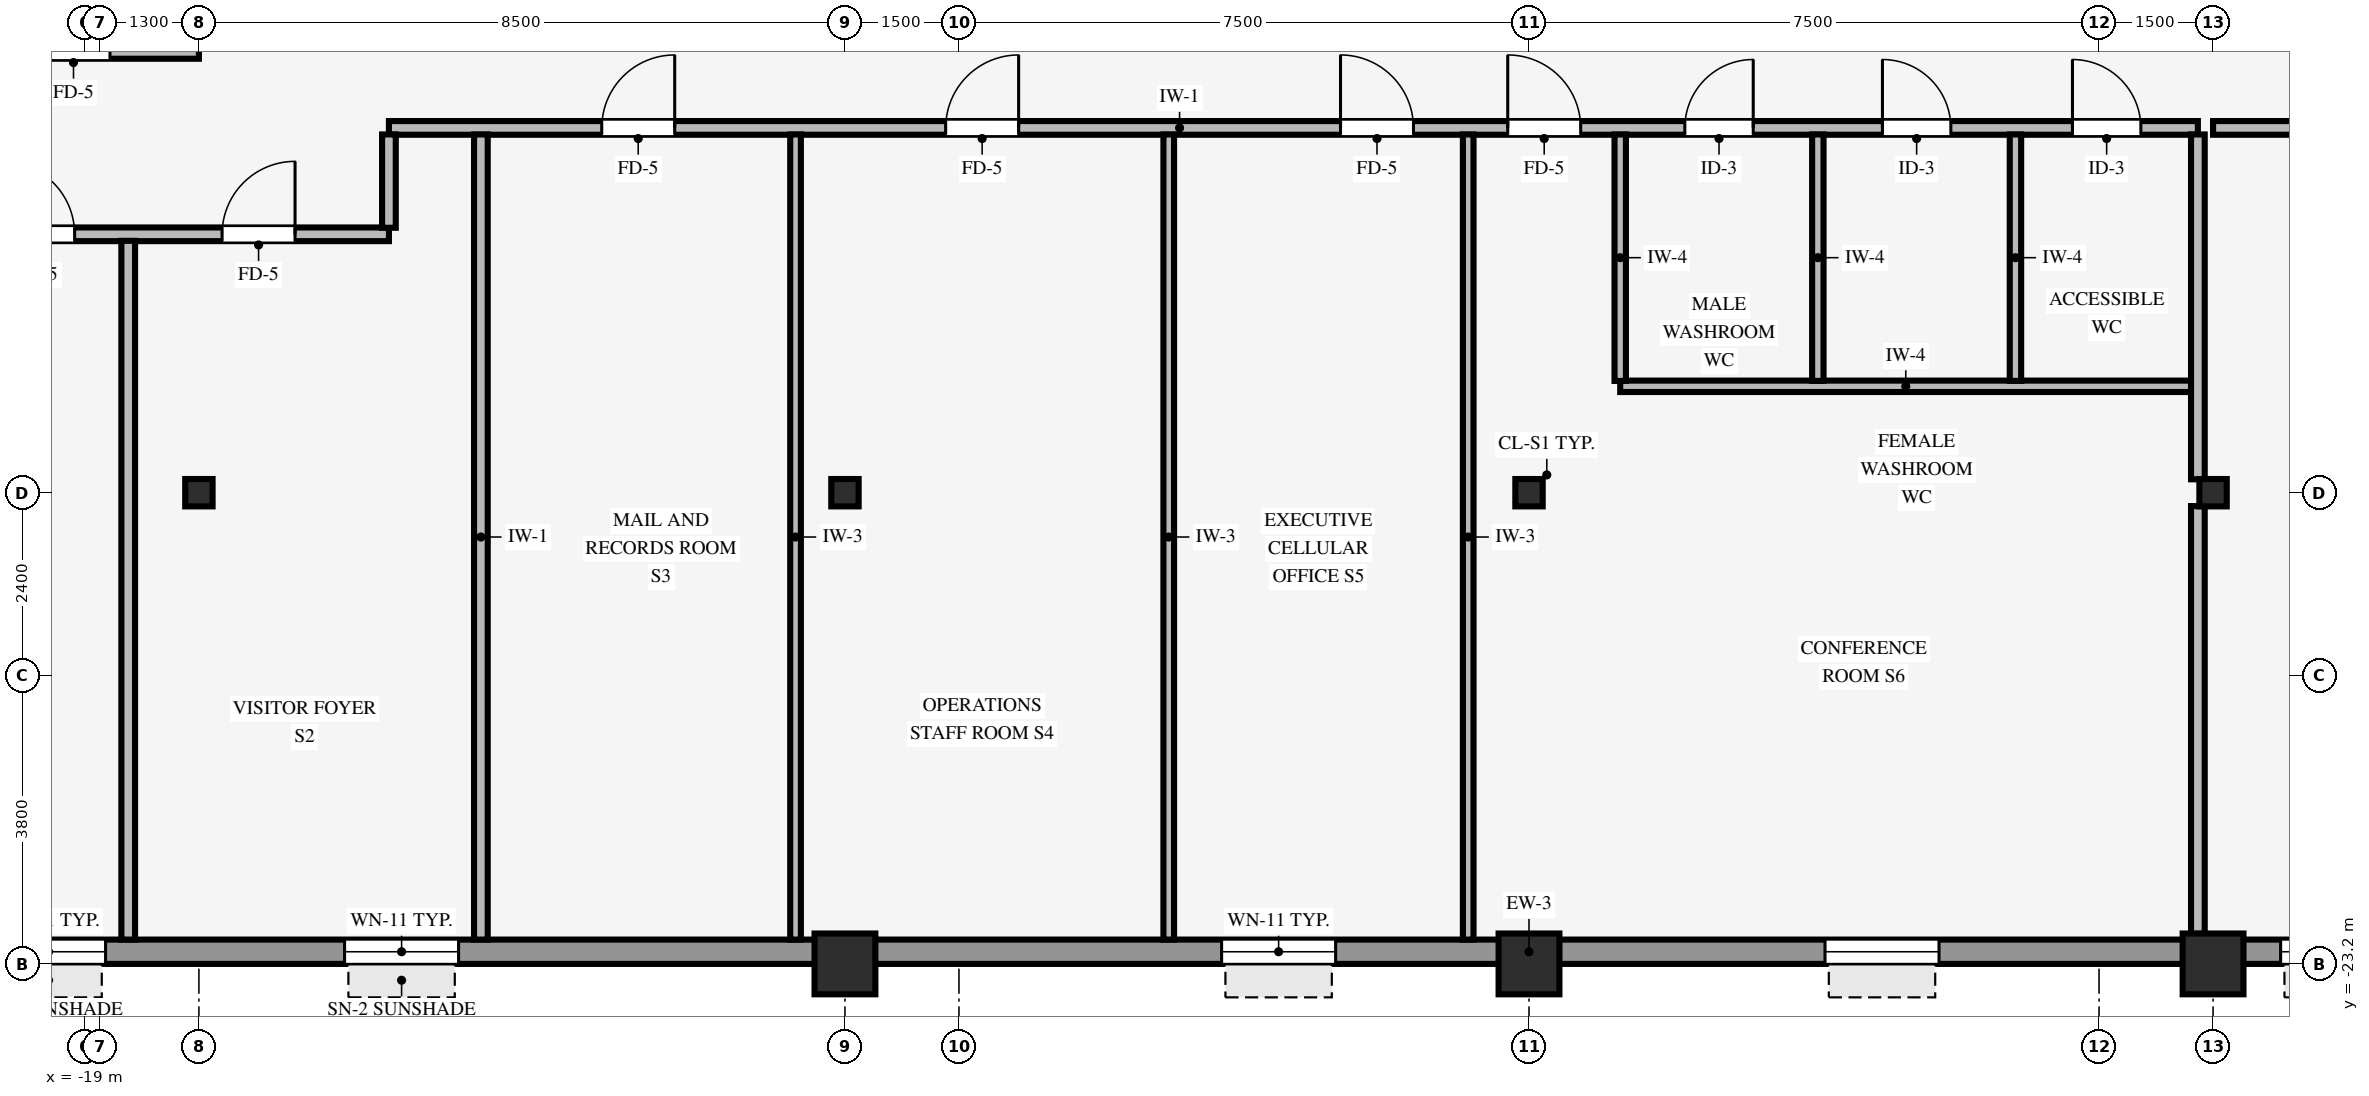
"""IFC4 building model, lengths in metres.
Left out: names, types, materials, properties, quantities, classifications, styles, units other than length and angle.
Written with IfcOpenShell. Run it as: python <this file> out.ifc"""

import sys

from ifc_helpers import new_model, si_unit, direction, frame, frame_2d, origin, origin_2d, place, context, subcontext, project, spatial, rectangle, hollow_rectangle, i_section, extrude, source, transform, mapped, element, fill, save


model = new_model("IFC4")
c1 = context("Model", 3, precision=1e-05, world=origin(), true_north=direction((0.0, 1.0)))
c2 = subcontext(c1, "Body", "Model", "MODEL_VIEW")
j1 = project(units=[si_unit("LENGTHUNIT", "METRE"), si_unit("PLANEANGLEUNIT", "RADIAN")], contexts=[c1])
p1 = place(None, origin())
s1 = spatial("IfcSite", under=j1, at=p1, CompositionType="ELEMENT")
p2 = place(p1, origin())
s2 = spatial("IfcBuilding", under=s1, at=p2, CompositionType="ELEMENT")
p3 = place(p2, frame((0.0, 0.0, 89.65)))
s3 = spatial("IfcBuildingStorey", under=s2, at=p3, CompositionType="ELEMENT", Elevation=89.65)
for number, where, z_axis, x_axis in (
    (1, (-9.0, -23.2, 0.0), (0.0, 0.0, 1.0), (1.0, 0.0, 0.0)),
    (2, (0.0, -23.2, 0.0), (0.0, 0.0, 1.0), (1.0, 0.0, 0.0)),
    (3, (9.0, -23.2, 0.0), (0.0, 0.0, 1.0), (1.0, 0.0, 0.0)),
):
    element("IfcColumn", number, at=place(p3, frame(where, z_axis=z_axis, x_axis=x_axis)), inside=s3, PredefinedType="COLUMN", context=c2, shape_type="SweptSolid", body=[
        extrude(hollow_rectangle(XDim=0.8, YDim=0.8, WallThickness=0.055, InnerFilletRadius=0.055, OuterFilletRadius=0.11, at=origin_2d()), origin(), (0.0, 0.0, 1.0), 3.25),
    ])
for number, where, z_axis, x_axis in (
    (4, (0.0, -17.0, 0.0), (0.0, 0.0, 1.0), (1.0, 0.0, 0.0)),
    (5, (-17.5, -17.0, 0.0), (0.0, 0.0, 1.0), (1.0, 0.0, 0.0)),
    (6, (-9.0, -17.0, 0.0), (0.0, 0.0, 1.0), (1.0, 0.0, 0.0)),
    (7, (9.0, -17.0, 0.0), (0.0, 0.0, 1.0), (1.0, 0.0, 0.0)),
):
    element("IfcColumn", number, at=place(p3, frame(where, z_axis=z_axis, x_axis=x_axis)), inside=s3, PredefinedType="COLUMN", context=c2, shape_type="SweptSolid", body=[
        extrude(i_section(OverallWidth=0.36, OverallDepth=0.36, WebThickness=0.021, FlangeThickness=0.021, FilletRadius=0.018, at=origin_2d()), origin(), (0.0, 0.0, 1.0), 3.25),
    ])
p4 = place(p3, frame((-21.9, -23.04, 0.0), z_axis=(0.0, 0.0, 1.0), x_axis=(1.0, 0.0, 0.0)))
e8 = element("IfcWall", 8, at=p4, inside=s3, PredefinedType="STANDARD", context=c2, shape_type="SweptSolid", body=[
    extrude(rectangle(XDim=43.8, YDim=0.32, at=frame_2d((21.9, 0.0))), origin(), (0.0, 0.0, 1.0), 2.585),
])
p5 = place(p4, frame((1.672, 0.0, 0.8)))
e9 = element("IfcOpeningElement", 9, at=p5, cuts=e8, PredefinedType="OPENING", context=c2, shape_type="SweptSolid", body=[
    extrude(rectangle(XDim=1.5, YDim=1.6, at=frame_2d((0.75, 0.8))), frame((0.0, 0.17, 0.0), z_axis=(0.0, -1.0, 0.0), x_axis=(1.0, 0.0, 0.0)), (0.0, 0.0, 1.0), 0.34),
])
p6 = place(p4, frame((6.317, 0.0, 0.8)))
e10 = element("IfcOpeningElement", 10, at=p6, cuts=e8, PredefinedType="OPENING", context=c2, shape_type="SweptSolid", body=[
    extrude(rectangle(XDim=1.5, YDim=1.6, at=frame_2d((0.75, 0.8))), frame((0.0, 0.17, 0.0), z_axis=(0.0, -1.0, 0.0), x_axis=(1.0, 0.0, 0.0)), (0.0, 0.0, 1.0), 0.34),
])
p7 = place(p4, frame((17.856, 0.0, 0.8)))
e11 = element("IfcOpeningElement", 11, at=p7, cuts=e8, PredefinedType="OPENING", context=c2, shape_type="SweptSolid", body=[
    extrude(rectangle(XDim=1.5, YDim=1.6, at=frame_2d((0.75, 0.8))), frame((0.0, 0.17, 0.0), z_axis=(0.0, -1.0, 0.0), x_axis=(1.0, 0.0, 0.0)), (0.0, 0.0, 1.0), 0.34),
])
p8 = place(p4, frame((25.794, 0.0, 0.8)))
e12 = element("IfcOpeningElement", 12, at=p8, cuts=e8, PredefinedType="OPENING", context=c2, shape_type="SweptSolid", body=[
    extrude(rectangle(XDim=1.5, YDim=1.6, at=frame_2d((0.75, 0.8))), frame((0.0, 0.17, 0.0), z_axis=(0.0, -1.0, 0.0), x_axis=(1.0, 0.0, 0.0)), (0.0, 0.0, 1.0), 0.34),
])
p9 = place(p4, frame((31.789, 0.0, 0.8)))
e13 = element("IfcOpeningElement", 13, at=p9, cuts=e8, PredefinedType="OPENING", context=c2, shape_type="SweptSolid", body=[
    extrude(rectangle(XDim=1.5, YDim=1.6, at=frame_2d((0.75, 0.8))), frame((0.0, 0.17, 0.0), z_axis=(0.0, -1.0, 0.0), x_axis=(1.0, 0.0, 0.0)), (0.0, 0.0, 1.0), 0.34),
])
p10 = place(p4, frame((35.083, 0.0, 0.8)))
e14 = element("IfcOpeningElement", 14, at=p10, cuts=e8, PredefinedType="OPENING", context=c2, shape_type="SweptSolid", body=[
    extrude(rectangle(XDim=1.5, YDim=1.6, at=frame_2d((0.75, 0.8))), frame((0.0, 0.17, 0.0), z_axis=(0.0, -1.0, 0.0), x_axis=(1.0, 0.0, 0.0)), (0.0, 0.0, 1.0), 0.34),
])
p11 = place(p4, frame((39.728, 0.0, 0.8)))
e15 = element("IfcOpeningElement", 15, at=p11, cuts=e8, PredefinedType="OPENING", context=c2, shape_type="SweptSolid", body=[
    extrude(rectangle(XDim=1.5, YDim=1.6, at=frame_2d((0.75, 0.8))), frame((0.0, 0.17, 0.0), z_axis=(0.0, -1.0, 0.0), x_axis=(1.0, 0.0, 0.0)), (0.0, 0.0, 1.0), 0.34),
])
p12 = place(p3, frame((1.2, -15.6, 0.0), z_axis=(0.0, 0.0, 1.0), x_axis=(1.0, 0.0, 0.0)))
e16 = element("IfcWall", 16, at=p12, inside=s3, PredefinedType="PARTITIONING", context=c2, shape_type="SweptSolid", body=[
    extrude(rectangle(XDim=7.514, YDim=0.15, at=frame_2d((3.757, 0.0))), origin(), (0.0, 0.0, 1.0), 3.24),
])
p13 = place(p3, frame((-20.8, -13.6, 0.0), z_axis=(0.0, 0.0, 1.0), x_axis=(1.0, 0.0, 0.0)))
e17 = element("IfcWall", 17, at=p13, inside=s3, PredefinedType="PARTITIONING", context=c2, shape_type="SweptSolid", body=[
    extrude(rectangle(XDim=5.8, YDim=0.18, at=frame_2d((2.9, 0.0))), origin(), (0.0, 0.0, 1.0), 2.878),
])
p14 = place(p13, frame((3.605, 0.0, 0.0)))
e18 = element("IfcOpeningElement", 18, at=p14, cuts=e17, PredefinedType="OPENING", context=c2, shape_type="SweptSolid", body=[
    extrude(rectangle(XDim=0.96, YDim=2.1, at=frame_2d((0.48, 1.05))), frame((0.0, 0.1, 0.0), z_axis=(0.0, -1.0, 0.0), x_axis=(1.0, 0.0, 0.0)), (0.0, 0.0, 1.0), 0.2),
])
p15 = place(p13, frame((0.705, 0.0, 0.0)))
e19 = element("IfcOpeningElement", 19, at=p15, cuts=e17, PredefinedType="OPENING", context=c2, shape_type="SweptSolid", body=[
    extrude(rectangle(XDim=0.96, YDim=2.1, at=frame_2d((0.48, 1.05))), frame((0.0, 0.1, 0.0), z_axis=(0.0, -1.0, 0.0), x_axis=(1.0, 0.0, 0.0)), (0.0, 0.0, 1.0), 0.2),
])
p16 = place(p3, frame((-15.0, -12.2, 0.0), z_axis=(0.0, 0.0, 1.0), x_axis=(1.0, 0.0, 0.0)))
e20 = element("IfcWall", 20, at=p16, inside=s3, PredefinedType="PARTITIONING", context=c2, shape_type="SweptSolid", body=[
    extrude(rectangle(XDim=23.8, YDim=0.18, at=frame_2d((11.9, 0.0))), origin(), (0.0, 0.0, 1.0), 3.24),
])
p17 = place(p16, frame((7.325, 0.0, 0.0)))
e21 = element("IfcOpeningElement", 21, at=p17, cuts=e20, PredefinedType="OPENING", context=c2, shape_type="SweptSolid", body=[
    extrude(rectangle(XDim=0.96, YDim=2.1, at=frame_2d((0.48, 1.05))), frame((0.0, 0.1, 0.0), z_axis=(0.0, -1.0, 0.0), x_axis=(1.0, 0.0, 0.0)), (0.0, 0.0, 1.0), 0.2),
])
p18 = place(p16, frame((2.8, 0.0, 0.0)))
e22 = element("IfcOpeningElement", 22, at=p18, cuts=e20, PredefinedType="OPENING", context=c2, shape_type="SweptSolid", body=[
    extrude(rectangle(XDim=0.96, YDim=2.1, at=frame_2d((0.48, 1.05))), frame((0.0, 0.1, 0.0), z_axis=(0.0, -1.0, 0.0), x_axis=(1.0, 0.0, 0.0)), (0.0, 0.0, 1.0), 0.2),
])
p19 = place(p16, frame((19.65, 0.0, 0.0)))
e23 = element("IfcOpeningElement", 23, at=p19, cuts=e20, PredefinedType="OPENING", context=c2, shape_type="SweptSolid", body=[
    extrude(rectangle(XDim=0.9, YDim=2.1, at=frame_2d((0.45, 1.05))), frame((0.0, 0.1, 0.0), z_axis=(0.0, -1.0, 0.0), x_axis=(1.0, 0.0, 0.0)), (0.0, 0.0, 1.0), 0.2),
])
p20 = place(p16, frame((17.05, 0.0, 0.0)))
e24 = element("IfcOpeningElement", 24, at=p20, cuts=e20, PredefinedType="OPENING", context=c2, shape_type="SweptSolid", body=[
    extrude(rectangle(XDim=0.9, YDim=2.1, at=frame_2d((0.45, 1.05))), frame((0.0, 0.1, 0.0), z_axis=(0.0, -1.0, 0.0), x_axis=(1.0, 0.0, 0.0)), (0.0, 0.0, 1.0), 0.2),
])
p21 = place(p16, frame((22.15, 0.0, 0.0)))
e25 = element("IfcOpeningElement", 25, at=p21, cuts=e20, PredefinedType="OPENING", context=c2, shape_type="SweptSolid", body=[
    extrude(rectangle(XDim=0.9, YDim=2.1, at=frame_2d((0.45, 1.05))), frame((0.0, 0.1, 0.0), z_axis=(0.0, -1.0, 0.0), x_axis=(1.0, 0.0, 0.0)), (0.0, 0.0, 1.0), 0.2),
])
p22 = place(p16, frame((12.52, 0.0, 0.0)))
e26 = element("IfcOpeningElement", 26, at=p22, cuts=e20, PredefinedType="OPENING", context=c2, shape_type="SweptSolid", body=[
    extrude(rectangle(XDim=0.96, YDim=2.1, at=frame_2d((0.48, 1.05))), frame((0.0, 0.1, 0.0), z_axis=(0.0, -1.0, 0.0), x_axis=(1.0, 0.0, 0.0)), (0.0, 0.0, 1.0), 0.2),
])
p23 = place(p16, frame((14.72, 0.0, 0.0)))
e27 = element("IfcOpeningElement", 27, at=p23, cuts=e20, PredefinedType="OPENING", context=c2, shape_type="SweptSolid", body=[
    extrude(rectangle(XDim=0.96, YDim=2.1, at=frame_2d((0.48, 1.05))), frame((0.0, 0.1, 0.0), z_axis=(0.0, -1.0, 0.0), x_axis=(1.0, 0.0, 0.0)), (0.0, 0.0, 1.0), 0.2),
])
p24 = place(p3, frame((9.0, -12.2, 0.0), z_axis=(0.0, 0.0, 1.0), x_axis=(1.0, 0.0, 0.0)))
e28 = element("IfcWall", 28, at=p24, inside=s3, PredefinedType="PARTITIONING", context=c2, shape_type="SweptSolid", body=[
    extrude(rectangle(XDim=6.0, YDim=0.18, at=frame_2d((3.0, 0.0))), origin(), (0.0, 0.0, 1.0), 3.24),
])
p25 = place(p24, frame((2.52, 0.0, 0.0)))
e29 = element("IfcOpeningElement", 29, at=p25, cuts=e28, PredefinedType="OPENING", context=c2, shape_type="SweptSolid", body=[
    extrude(rectangle(XDim=0.96, YDim=2.1, at=frame_2d((0.48, 1.05))), frame((0.0, 0.1, 0.0), z_axis=(0.0, -1.0, 0.0), x_axis=(1.0, 0.0, 0.0)), (0.0, 0.0, 1.0), 0.2),
])
p26 = place(p3, frame((-23.68, -11.2, 0.0), z_axis=(0.0, 0.0, 1.0), x_axis=(1.0, 0.0, 0.0)))
e30 = element("IfcWall", 30, at=p26, inside=s3, PredefinedType="PARTITIONING", context=c2, shape_type="SweptSolid", body=[
    extrude(rectangle(XDim=6.18, YDim=0.18, at=frame_2d((3.09, 0.0))), origin(), (0.0, 0.0, 1.0), 3.24),
])
p27 = place(p26, frame((4.05, 0.0, 0.0)))
e31 = element("IfcOpeningElement", 31, at=p27, cuts=e30, PredefinedType="OPENING", context=c2, shape_type="SweptSolid", body=[
    extrude(rectangle(XDim=0.96, YDim=2.1, at=frame_2d((0.48, 1.05))), frame((0.0, 0.1, 0.0), z_axis=(0.0, -1.0, 0.0), x_axis=(1.0, 0.0, 0.0)), (0.0, 0.0, 1.0), 0.2),
])
p28 = place(p3, frame((-18.43, -22.88, 0.0), z_axis=(0.0, 0.0, 1.0), x_axis=(0.0, 1.0, 0.0)))
e32 = element("IfcWall", 32, at=p28, inside=s3, PredefinedType="PARTITIONING", context=c2, shape_type="SweptSolid", body=[
    extrude(rectangle(XDim=9.194, YDim=0.18, at=frame_2d((4.597, 0.0))), origin(), (0.0, 0.0, 1.0), 3.24),
])
p29 = place(p3, frame((-15.0, -13.514, 0.0), z_axis=(0.0, 0.0, 1.0), x_axis=(0.0, 1.0, 0.0)))
e33 = element("IfcWall", 33, at=p29, inside=s3, PredefinedType="PARTITIONING", context=c2, shape_type="SweptSolid", body=[
    extrude(rectangle(XDim=1.228, YDim=0.18, at=frame_2d((0.614, 0.0))), origin(), (0.0, 0.0, 1.0), 3.24),
])
p30 = place(p3, frame((-13.79, -22.88, 0.0), z_axis=(0.0, 0.0, 1.0), x_axis=(0.0, 1.0, 0.0)))
e34 = element("IfcWall", 34, at=p30, inside=s3, PredefinedType="PARTITIONING", context=c2, shape_type="SweptSolid", body=[
    extrude(rectangle(XDim=10.594, YDim=0.18, at=frame_2d((5.297, 0.0))), origin(), (0.0, 0.0, 1.0), 3.24),
])
for number, where, z_axis, x_axis in (
    (35, (-9.65, -22.88, 0.0), (0.0, 0.0, 1.0), (0.0, 1.0, 0.0)),
    (36, (-4.74, -22.88, 0.0), (0.0, 0.0, 1.0), (0.0, 1.0, 0.0)),
    (37, (-0.8, -22.88, 0.0), (0.0, 0.0, 1.0), (0.0, 1.0, 0.0)),
):
    element("IfcWall", number, at=place(p3, frame(where, z_axis=z_axis, x_axis=x_axis)), inside=s3, PredefinedType="PARTITIONING", context=c2, shape_type="SweptSolid", body=[
        extrude(rectangle(XDim=10.594, YDim=0.14, at=frame_2d((5.297, 0.0))), origin(), (0.0, 0.0, 1.0), 3.24),
    ])
for number, where, z_axis, x_axis in (
    (38, (1.2, -15.529, 0.0), (0.0, 0.0, 1.0), (0.0, 1.0, 0.0)),
    (39, (3.8, -15.529, 0.0), (0.0, 0.0, 1.0), (0.0, 1.0, 0.0)),
    (40, (6.4, -15.529, 0.0), (0.0, 0.0, 1.0), (0.0, 1.0, 0.0)),
):
    element("IfcWall", number, at=place(p3, frame(where, z_axis=z_axis, x_axis=x_axis)), inside=s3, PredefinedType="PARTITIONING", context=c2, shape_type="SweptSolid", body=[
        extrude(rectangle(XDim=3.243, YDim=0.15, at=frame_2d((1.622, 0.0))), origin(), (0.0, 0.0, 1.0), 3.24),
    ])
p31 = place(p3, frame((8.8, -22.804, 0.0), z_axis=(0.0, 0.0, 1.0), x_axis=(0.0, 1.0, 0.0)))
e41 = element("IfcWall", 41, at=p31, inside=s3, PredefinedType="PARTITIONING", context=c2, shape_type="SweptSolid", body=[
    extrude(rectangle(XDim=5.628, YDim=0.18, at=frame_2d((2.814, 0.0))), origin(), (0.0, 0.0, 1.0), 2.335),
])
p32 = place(p3, frame((8.8, -16.824, 0.0), z_axis=(0.0, 0.0, 1.0), x_axis=(0.0, 1.0, 0.0)))
e42 = element("IfcWall", 42, at=p32, inside=s3, PredefinedType="PARTITIONING", context=c2, shape_type="SweptSolid", body=[
    extrude(rectangle(XDim=4.538, YDim=0.18, at=frame_2d((2.269, 0.0))), origin(), (0.0, 0.0, 1.0), 2.335),
])
m1 = source(origin(), c2, "Body", "SweptSolid", [
    extrude(rectangle(XDim=1.5, YDim=1.6, at=frame_2d((0.75, 0.8))), frame((0.0, 0.03, 0.0), z_axis=(0.0, -1.0, 0.0), x_axis=(1.0, 0.0, 0.0)), (0.0, 0.0, 1.0), 0.06),
])
p33 = place(p5, origin())
e43 = element("IfcWindow", 43, at=p33, inside=s3, PartitioningType="SINGLE_PANEL", PredefinedType="WINDOW", context=c2, shape_type="MappedRepresentation", body=[
    mapped(m1, transform((0.0, 0.0, 0.0), scale=1.0)),
])
fill(e9, e43)
p34 = place(p6, origin())
e44 = element("IfcWindow", 44, at=p34, inside=s3, PartitioningType="SINGLE_PANEL", PredefinedType="WINDOW", context=c2, shape_type="MappedRepresentation", body=[
    mapped(m1, transform((0.0, 0.0, 0.0), scale=1.0)),
])
fill(e10, e44)
p35 = place(p7, origin())
e45 = element("IfcWindow", 45, at=p35, inside=s3, PartitioningType="SINGLE_PANEL", PredefinedType="WINDOW", context=c2, shape_type="MappedRepresentation", body=[
    mapped(m1, transform((0.0, 0.0, 0.0), scale=1.0)),
])
fill(e11, e45)
p36 = place(p8, origin())
e46 = element("IfcWindow", 46, at=p36, inside=s3, PartitioningType="SINGLE_PANEL", PredefinedType="WINDOW", context=c2, shape_type="MappedRepresentation", body=[
    mapped(m1, transform((0.0, 0.0, 0.0), scale=1.0)),
])
fill(e12, e46)
p37 = place(p9, origin())
e47 = element("IfcWindow", 47, at=p37, inside=s3, PartitioningType="SINGLE_PANEL", PredefinedType="WINDOW", context=c2, shape_type="MappedRepresentation", body=[
    mapped(m1, transform((0.0, 0.0, 0.0), scale=1.0)),
])
fill(e13, e47)
m2 = source(origin(), c2, "Body", "SweptSolid", [
    extrude(rectangle(XDim=0.96, YDim=2.1, at=frame_2d((0.48, 1.05))), frame((0.0, 0.025, 0.0), z_axis=(0.0, -1.0, 0.0), x_axis=(1.0, 0.0, 0.0)), (0.0, 0.0, 1.0), 0.05),
])
p38 = place(p17, origin())
e48 = element("IfcDoor", 48, at=p38, inside=s3, OperationType="SINGLE_SWING_RIGHT", PredefinedType="DOOR", context=c2, shape_type="MappedRepresentation", body=[
    mapped(m2, transform((0.0, 0.0, 0.0), scale=1.0)),
])
fill(e21, e48)
p39 = place(p18, origin())
e49 = element("IfcDoor", 49, at=p39, inside=s3, OperationType="SINGLE_SWING_RIGHT", PredefinedType="DOOR", context=c2, shape_type="MappedRepresentation", body=[
    mapped(m2, transform((0.0, 0.0, 0.0), scale=1.0)),
])
fill(e22, e49)
p40 = place(p14, origin())
e50 = element("IfcDoor", 50, at=p40, inside=s3, OperationType="SINGLE_SWING_RIGHT", PredefinedType="DOOR", context=c2, shape_type="MappedRepresentation", body=[
    mapped(m2, transform((0.0, 0.0, 0.0), scale=1.0)),
])
fill(e18, e50)
p41 = place(p27, origin())
e51 = element("IfcDoor", 51, at=p41, inside=s3, OperationType="SINGLE_SWING_LEFT", PredefinedType="DOOR", context=c2, shape_type="MappedRepresentation", body=[
    mapped(m2, transform((0.0, 0.0, 0.0), scale=1.0)),
])
fill(e31, e51)
m3 = source(origin(), c2, "Body", "SweptSolid", [
    extrude(rectangle(XDim=0.9, YDim=2.1, at=frame_2d((0.45, 1.05))), frame((0.0, 0.025, 0.0), z_axis=(0.0, -1.0, 0.0), x_axis=(1.0, 0.0, 0.0)), (0.0, 0.0, 1.0), 0.05),
])
p42 = place(p19, origin())
e52 = element("IfcDoor", 52, at=p42, inside=s3, OperationType="SINGLE_SWING_LEFT", PredefinedType="DOOR", context=c2, shape_type="MappedRepresentation", body=[
    mapped(m3, transform((0.0, 0.0, 0.0), scale=1.0)),
])
fill(e23, e52)
p43 = place(p20, origin())
e53 = element("IfcDoor", 53, at=p43, inside=s3, OperationType="SINGLE_SWING_RIGHT", PredefinedType="DOOR", context=c2, shape_type="MappedRepresentation", body=[
    mapped(m3, transform((0.0, 0.0, 0.0), scale=1.0)),
])
fill(e24, e53)
p44 = place(p21, origin())
e54 = element("IfcDoor", 54, at=p44, inside=s3, OperationType="SINGLE_SWING_LEFT", PredefinedType="DOOR", context=c2, shape_type="MappedRepresentation", body=[
    mapped(m3, transform((0.0, 0.0, 0.0), scale=1.0)),
])
fill(e25, e54)
p45 = place(p22, origin())
e55 = element("IfcDoor", 55, at=p45, inside=s3, OperationType="SINGLE_SWING_LEFT", PredefinedType="DOOR", context=c2, shape_type="MappedRepresentation", body=[
    mapped(m2, transform((0.0, 0.0, 0.0), scale=1.0)),
])
fill(e26, e55)
p46 = place(p15, origin())
e56 = element("IfcDoor", 56, at=p46, inside=s3, OperationType="SINGLE_SWING_LEFT", PredefinedType="DOOR", context=c2, shape_type="MappedRepresentation", body=[
    mapped(m2, transform((0.0, 0.0, 0.0), scale=1.0)),
])
fill(e19, e56)
p47 = place(p23, origin())
e57 = element("IfcDoor", 57, at=p47, inside=s3, OperationType="SINGLE_SWING_LEFT", PredefinedType="DOOR", context=c2, shape_type="MappedRepresentation", body=[
    mapped(m2, transform((0.0, 0.0, 0.0), scale=1.0)),
])
fill(e27, e57)
save(model, sys.argv[1])
